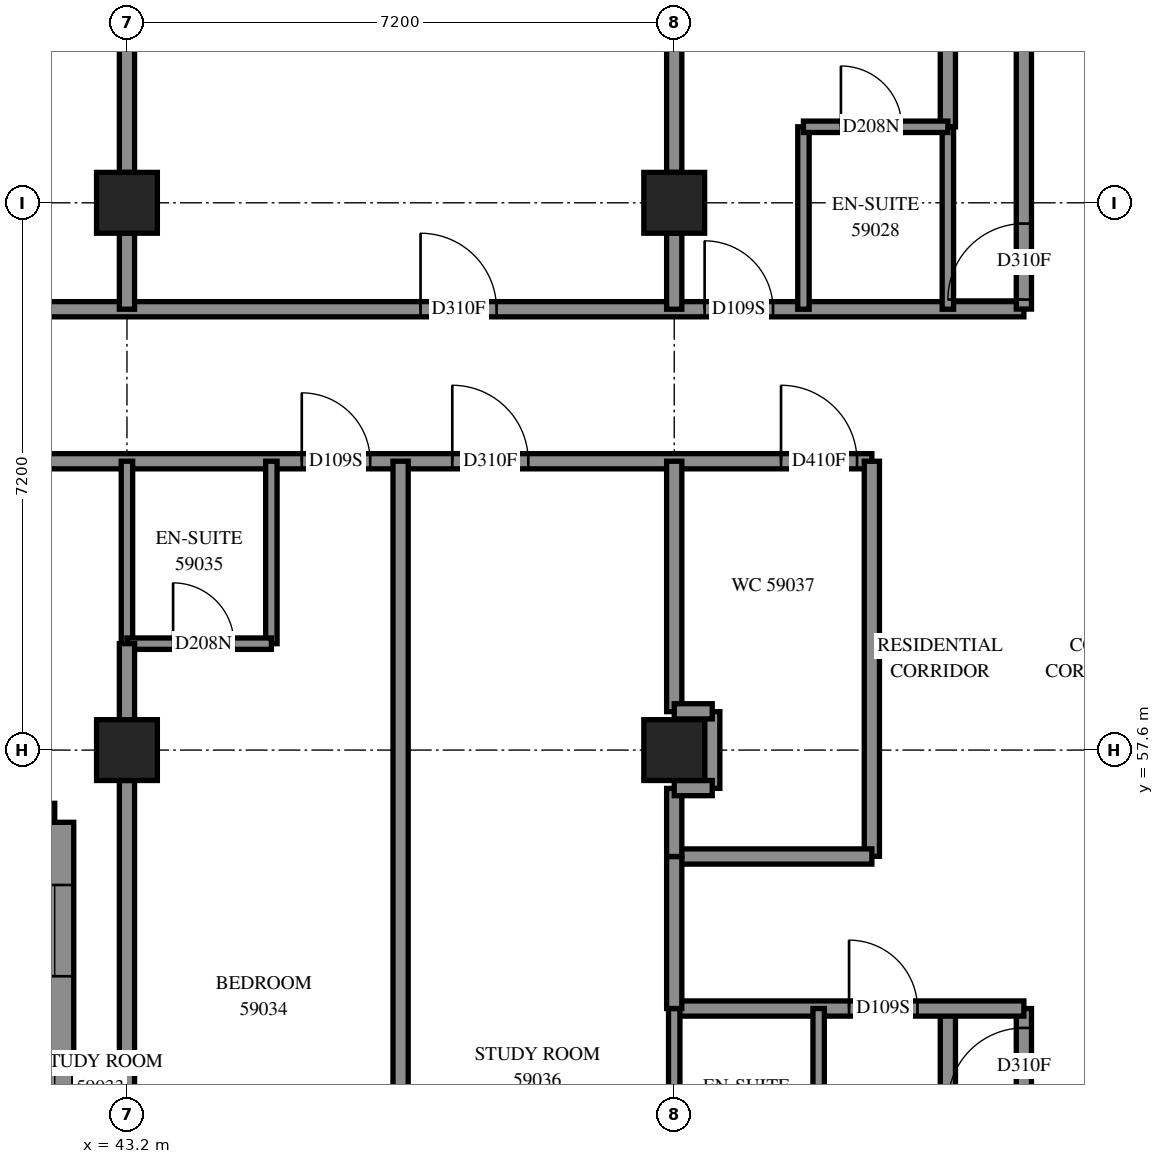
"""IFC4 building model, lengths in metres.
Left out: names, types, materials, properties, quantities, classifications, styles, units other than length and angle.
Written with IfcOpenShell. Run it as: python <this file> out.ifc"""

import sys

from ifc_helpers import new_model, si_unit, direction, frame, frame_2d, origin, origin_2d, place, context, subcontext, project, spatial, polyline, rectangle, outline, extrude, element, fill, save


model = new_model("IFC4")
c1 = context("Model", 3, precision=1e-05, world=origin(), true_north=direction((0.0, 1.0)))
c2 = subcontext(c1, "Body", "Model", "MODEL_VIEW")
j1 = project(units=[si_unit("LENGTHUNIT", "METRE"), si_unit("PLANEANGLEUNIT", "RADIAN")], contexts=[c1])
p1 = place(None, origin())
s1 = spatial("IfcSite", under=j1, at=p1, CompositionType="ELEMENT")
p2 = place(p1, origin())
s2 = spatial("IfcBuilding", under=s1, at=p2, CompositionType="ELEMENT")
p3 = place(p2, frame((0.0, 0.0, 216.8)))
s3 = spatial("IfcBuildingStorey", under=s2, at=p3, CompositionType="ELEMENT", Elevation=216.8)
for number, where, z_axis, x_axis in (
    (1, (43.2, 57.6, 0.0), (0.0, 0.0, 1.0), (1.0, 0.0, 0.0)),
    (2, (43.2, 64.8, 0.0), (0.0, 0.0, 1.0), (1.0, 0.0, 0.0)),
    (3, (50.4, 57.6, 0.0), (0.0, 0.0, 1.0), (1.0, 0.0, 0.0)),
    (4, (50.4, 64.8, 0.0), (0.0, 0.0, 1.0), (1.0, 0.0, 0.0)),
):
    element("IfcColumn", number, at=place(p3, frame(where, z_axis=z_axis, x_axis=x_axis)), inside=s3, PredefinedType="COLUMN", context=c2, shape_type="SweptSolid", body=[
        extrude(rectangle(XDim=0.8, YDim=0.8, at=origin_2d()), origin(), (0.0, 0.0, 1.0), 3.1),
    ])
p4 = place(p3, frame((35.05, 56.65, 0.0), z_axis=(0.0, 0.0, 1.0), x_axis=(1.0, 0.0, 0.0)))
e5 = element("IfcWall", 5, at=p4, inside=s3, PredefinedType="SOLIDWALL", context=c2, shape_type="SweptSolid", body=[
    extrude(outline(polyline([(-0.25, -0.25), (6.95, -0.25), (7.45, 0.25), (0.25, 0.25), (-0.25, -0.25)])), origin(), (0.0, 0.0, 1.0), 3.1),
])
p5 = place(p4, frame((1.35, 0.0, 0.45)))
e6 = element("IfcOpeningElement", 6, at=p5, cuts=e5, PredefinedType="OPENING", context=c2, shape_type="SweptSolid", body=[
    extrude(rectangle(XDim=1.3, YDim=2.5, at=frame_2d((0.65, 1.25))), frame((0.0, 0.26, 0.0), z_axis=(0.0, -1.0, 0.0), x_axis=(1.0, 0.0, 0.0)), (0.0, 0.0, 1.0), 0.52),
])
p6 = place(p4, frame((2.85, 0.0, 0.45)))
e7 = element("IfcOpeningElement", 7, at=p6, cuts=e5, PredefinedType="OPENING", context=c2, shape_type="SweptSolid", body=[
    extrude(rectangle(XDim=1.3, YDim=2.5, at=frame_2d((0.65, 1.25))), frame((0.0, 0.26, 0.0), z_axis=(0.0, -1.0, 0.0), x_axis=(1.0, 0.0, 0.0)), (0.0, 0.0, 1.0), 0.52),
])
p7 = place(p4, frame((5.175, 0.0, 0.45)))
e8 = element("IfcOpeningElement", 8, at=p7, cuts=e5, PredefinedType="OPENING", context=c2, shape_type="SweptSolid", body=[
    extrude(rectangle(XDim=1.2, YDim=2.5, at=frame_2d((0.6, 1.25))), frame((0.0, 0.26, 0.0), z_axis=(0.0, -1.0, 0.0), x_axis=(1.0, 0.0, 0.0)), (0.0, 0.0, 1.0), 0.52),
])
p8 = place(p3, frame((42.25, 56.65, 0.0), z_axis=(0.0, 0.0, 1.0), x_axis=(0.0, -1.0, 0.0)))
e9 = element("IfcWall", 9, at=p8, inside=s3, PredefinedType="SOLIDWALL", context=c2, shape_type="SweptSolid", body=[
    extrude(outline(polyline([(0.25, -0.25), (7.45, -0.25), (6.95, 0.25), (-0.25, 0.25), (0.25, -0.25)])), origin(), (0.0, 0.0, 1.0), 3.1),
])
p9 = place(p8, frame((3.05, 0.0, 0.45)))
e10 = element("IfcOpeningElement", 10, at=p9, cuts=e9, PredefinedType="OPENING", context=c2, shape_type="SweptSolid", body=[
    extrude(rectangle(XDim=1.3, YDim=2.5, at=frame_2d((0.65, 1.25))), frame((0.0, 0.26, 0.0), z_axis=(0.0, -1.0, 0.0), x_axis=(1.0, 0.0, 0.0)), (0.0, 0.0, 1.0), 0.52),
])
p10 = place(p8, frame((4.55, 0.0, 0.45)))
e11 = element("IfcOpeningElement", 11, at=p10, cuts=e9, PredefinedType="OPENING", context=c2, shape_type="SweptSolid", body=[
    extrude(rectangle(XDim=1.3, YDim=2.5, at=frame_2d((0.65, 1.25))), frame((0.0, 0.26, 0.0), z_axis=(0.0, -1.0, 0.0), x_axis=(1.0, 0.0, 0.0)), (0.0, 0.0, 1.0), 0.52),
])
p11 = place(p8, frame((0.825, 0.0, 0.45)))
e12 = element("IfcOpeningElement", 12, at=p11, cuts=e9, PredefinedType="OPENING", context=c2, shape_type="SweptSolid", body=[
    extrude(rectangle(XDim=1.2, YDim=2.5, at=frame_2d((0.6, 1.25))), frame((0.0, 0.26, 0.0), z_axis=(0.0, -1.0, 0.0), x_axis=(1.0, 0.0, 0.0)), (0.0, 0.0, 1.0), 0.52),
])
p12 = place(p3, frame((36.0, 61.4, 0.0), z_axis=(0.0, 0.0, 1.0), x_axis=(1.0, 0.0, 0.0)))
e13 = element("IfcWall", 13, at=p12, inside=s3, PredefinedType="PARTITIONING", context=c2, shape_type="SweptSolid", body=[
    extrude(rectangle(XDim=17.0, YDim=0.2, at=frame_2d((8.5, 0.0))), origin(), (0.0, 0.0, 1.0), 3.1),
])
p13 = place(p12, frame((2.3, 0.0, 0.0)))
e14 = element("IfcOpeningElement", 14, at=p13, cuts=e13, PredefinedType="OPENING", context=c2, shape_type="SweptSolid", body=[
    extrude(rectangle(XDim=0.9, YDim=2.1, at=frame_2d((0.45, 1.05))), frame((0.0, 0.11, 0.0), z_axis=(0.0, -1.0, 0.0), x_axis=(1.0, 0.0, 0.0)), (0.0, 0.0, 1.0), 0.22),
])
p14 = place(p12, frame((4.107, 0.0, 0.0)))
e15 = element("IfcOpeningElement", 15, at=p14, cuts=e13, PredefinedType="OPENING", context=c2, shape_type="SweptSolid", body=[
    extrude(rectangle(XDim=1.0, YDim=2.1, at=frame_2d((0.5, 1.05))), frame((0.0, 0.11, 0.0), z_axis=(0.0, -1.0, 0.0), x_axis=(1.0, 0.0, 0.0)), (0.0, 0.0, 1.0), 0.22),
])
p15 = place(p12, frame((9.5, 0.0, 0.0)))
e16 = element("IfcOpeningElement", 16, at=p15, cuts=e13, PredefinedType="OPENING", context=c2, shape_type="SweptSolid", body=[
    extrude(rectangle(XDim=0.9, YDim=2.1, at=frame_2d((0.45, 1.05))), frame((0.0, 0.11, 0.0), z_axis=(0.0, -1.0, 0.0), x_axis=(1.0, 0.0, 0.0)), (0.0, 0.0, 1.0), 0.22),
])
p16 = place(p12, frame((11.48, 0.0, 0.0)))
e17 = element("IfcOpeningElement", 17, at=p16, cuts=e13, PredefinedType="OPENING", context=c2, shape_type="SweptSolid", body=[
    extrude(rectangle(XDim=1.0, YDim=2.1, at=frame_2d((0.5, 1.05))), frame((0.0, 0.11, 0.0), z_axis=(0.0, -1.0, 0.0), x_axis=(1.0, 0.0, 0.0)), (0.0, 0.0, 1.0), 0.22),
])
p17 = place(p12, frame((15.805, 0.0, 0.0)))
e18 = element("IfcOpeningElement", 18, at=p17, cuts=e13, PredefinedType="OPENING", context=c2, shape_type="SweptSolid", body=[
    extrude(rectangle(XDim=1.0, YDim=2.1, at=frame_2d((0.5, 1.05))), frame((0.0, 0.11, 0.0), z_axis=(0.0, -1.0, 0.0), x_axis=(1.0, 0.0, 0.0)), (0.0, 0.0, 1.0), 0.22),
])
p18 = place(p3, frame((40.602, 63.4, 0.0), z_axis=(0.0, 0.0, 1.0), x_axis=(1.0, 0.0, 0.0)))
e19 = element("IfcWall", 19, at=p18, inside=s3, PredefinedType="PARTITIONING", context=c2, shape_type="SweptSolid", body=[
    extrude(rectangle(XDim=14.398, YDim=0.2, at=frame_2d((7.199, 0.0))), origin(), (0.0, 0.0, 1.0), 3.1),
])
p19 = place(p18, frame((0.124, 0.0, 0.0)))
e20 = element("IfcOpeningElement", 20, at=p19, cuts=e19, PredefinedType="OPENING", context=c2, shape_type="SweptSolid", body=[
    extrude(rectangle(XDim=1.0, YDim=2.1, at=frame_2d((0.5, 1.05))), frame((0.0, 0.11, 0.0), z_axis=(0.0, -1.0, 0.0), x_axis=(1.0, 0.0, 0.0)), (0.0, 0.0, 1.0), 0.22),
])
p20 = place(p18, frame((6.46, 0.0, 0.0)))
e21 = element("IfcOpeningElement", 21, at=p20, cuts=e19, PredefinedType="OPENING", context=c2, shape_type="SweptSolid", body=[
    extrude(rectangle(XDim=1.0, YDim=2.1, at=frame_2d((0.5, 1.05))), frame((0.0, 0.11, 0.0), z_axis=(0.0, -1.0, 0.0), x_axis=(1.0, 0.0, 0.0)), (0.0, 0.0, 1.0), 0.22),
])
p21 = place(p18, frame((10.198, 0.0, 0.0)))
e22 = element("IfcOpeningElement", 22, at=p21, cuts=e19, PredefinedType="OPENING", context=c2, shape_type="SweptSolid", body=[
    extrude(rectangle(XDim=0.9, YDim=2.1, at=frame_2d((0.45, 1.05))), frame((0.0, 0.11, 0.0), z_axis=(0.0, -1.0, 0.0), x_axis=(1.0, 0.0, 0.0)), (0.0, 0.0, 1.0), 0.22),
])
p22 = place(p3, frame((54.0, 42.327, 0.0), z_axis=(0.0, 0.0, 1.0), x_axis=(0.0, 1.0, 0.0)))
e23 = element("IfcWall", 23, at=p22, inside=s3, PredefinedType="PARTITIONING", context=c2, shape_type="SweptSolid", body=[
    extrude(rectangle(XDim=11.873, YDim=0.2, at=frame_2d((5.936, 0.0))), origin(), (0.0, 0.0, 1.0), 3.1),
])
p23 = place(p3, frame((46.8, 49.7, 0.0), z_axis=(0.0, 0.0, 1.0), x_axis=(0.0, 1.0, 0.0)))
e24 = element("IfcWall", 24, at=p23, inside=s3, PredefinedType="PARTITIONING", context=c2, shape_type="SweptSolid", body=[
    extrude(rectangle(XDim=11.7, YDim=0.2, at=frame_2d((5.85, 0.0))), origin(), (0.0, 0.0, 1.0), 3.1),
])
p24 = place(p3, frame((54.0, 65.8, 0.0), z_axis=(0.0, 0.0, 1.0), x_axis=(0.0, 1.0, 0.0)))
e25 = element("IfcWall", 25, at=p24, inside=s3, PredefinedType="PARTITIONING", context=c2, shape_type="SweptSolid", body=[
    extrude(rectangle(XDim=6.992, YDim=0.2, at=frame_2d((3.496, 0.0))), origin(), (0.0, 0.0, 1.0), 3.1),
])
p25 = place(p3, frame((43.2, 50.8, 0.0), z_axis=(0.0, 0.0, 1.0), x_axis=(0.0, 1.0, 0.0)))
e26 = element("IfcWall", 26, at=p25, inside=s3, PredefinedType="PARTITIONING", context=c2, shape_type="SweptSolid", body=[
    extrude(rectangle(XDim=6.4, YDim=0.2, at=frame_2d((3.2, 0.0))), origin(), (0.0, 0.0, 1.0), 2.6),
])
p26 = place(p3, frame((55.0, 47.8, 0.0), z_axis=(0.0, 0.0, 1.0), x_axis=(0.0, 1.0, 0.0)))
e27 = element("IfcWall", 27, at=p26, inside=s3, PredefinedType="PARTITIONING", context=c2, shape_type="SweptSolid", body=[
    extrude(rectangle(XDim=6.4, YDim=0.2, at=frame_2d((3.2, 0.0))), origin(), (0.0, 0.0, 1.0), 3.1),
])
p27 = place(p26, frame((5.145, 0.0, 0.0)))
e28 = element("IfcOpeningElement", 28, at=p27, cuts=e27, PredefinedType="OPENING", context=c2, shape_type="SweptSolid", body=[
    extrude(rectangle(XDim=1.0, YDim=2.1, at=frame_2d((0.5, 1.05))), frame((0.0, 0.11, 0.0), z_axis=(0.0, -1.0, 0.0), x_axis=(1.0, 0.0, 0.0)), (0.0, 0.0, 1.0), 0.22),
])
for number, where, z_axis, x_axis in (
    (29, (43.2, 65.2, 0.0), (0.0, 0.0, 1.0), (0.0, 1.0, 0.0)),
    (30, (50.4, 65.2, 0.0), (0.0, 0.0, 1.0), (0.0, 1.0, 0.0)),
):
    element("IfcWall", number, at=place(p3, frame(where, z_axis=z_axis, x_axis=x_axis)), inside=s3, PredefinedType="PARTITIONING", context=c2, shape_type="SweptSolid", body=[
        extrude(rectangle(XDim=6.4, YDim=0.2, at=frame_2d((3.2, 0.0))), origin(), (0.0, 0.0, 1.0), 3.1),
    ])
p28 = place(p3, frame((53.0, 56.202, 0.0), z_axis=(0.0, 0.0, 1.0), x_axis=(0.0, 1.0, 0.0)))
e31 = element("IfcWall", 31, at=p28, inside=s3, PredefinedType="PARTITIONING", context=c2, shape_type="SweptSolid", body=[
    extrude(rectangle(XDim=5.198, YDim=0.2, at=frame_2d((2.599, 0.0))), origin(), (0.0, 0.0, 1.0), 3.1),
])
p29 = place(p3, frame((50.4, 54.2, 0.0), z_axis=(0.0, 0.0, 1.0), x_axis=(1.0, 0.0, 0.0)))
e32 = element("IfcWall", 32, at=p29, inside=s3, PredefinedType="PARTITIONING", context=c2, shape_type="SweptSolid", body=[
    extrude(rectangle(XDim=4.6, YDim=0.2, at=frame_2d((2.3, 0.0))), origin(), (0.0, 0.0, 1.0), 3.1),
])
p30 = place(p29, frame((2.3, 0.0, 0.0)))
e33 = element("IfcOpeningElement", 33, at=p30, cuts=e32, PredefinedType="OPENING", context=c2, shape_type="SweptSolid", body=[
    extrude(rectangle(XDim=0.9, YDim=2.1, at=frame_2d((0.45, 1.05))), frame((0.0, 0.11, 0.0), z_axis=(0.0, -1.0, 0.0), x_axis=(1.0, 0.0, 0.0)), (0.0, 0.0, 1.0), 0.22),
])
p31 = place(p3, frame((55.0, 63.402, 0.0), z_axis=(0.0, 0.0, 1.0), x_axis=(0.0, 1.0, 0.0)))
e34 = element("IfcWall", 34, at=p31, inside=s3, PredefinedType="PARTITIONING", context=c2, shape_type="SweptSolid", body=[
    extrude(rectangle(XDim=3.998, YDim=0.2, at=frame_2d((1.999, 0.0))), origin(), (0.0, 0.0, 1.0), 3.1),
])
p32 = place(p31, frame((0.125, 0.0, 0.0)))
e35 = element("IfcOpeningElement", 35, at=p32, cuts=e34, PredefinedType="OPENING", context=c2, shape_type="SweptSolid", body=[
    extrude(rectangle(XDim=1.0, YDim=2.1, at=frame_2d((0.5, 1.05))), frame((0.0, 0.11, 0.0), z_axis=(0.0, -1.0, 0.0), x_axis=(1.0, 0.0, 0.0)), (0.0, 0.0, 1.0), 0.22),
])
p33 = place(p3, frame((50.4, 58.106, 0.0), z_axis=(0.0, 0.0, 1.0), x_axis=(0.0, 1.0, 0.0)))
e36 = element("IfcWall", 36, at=p33, inside=s3, PredefinedType="PARTITIONING", context=c2, shape_type="SweptSolid", body=[
    extrude(rectangle(XDim=3.294, YDim=0.2, at=frame_2d((1.647, 0.0))), origin(), (0.0, 0.0, 1.0), 3.1),
])
p34 = place(p3, frame((50.4, 56.2, 0.0), z_axis=(0.0, 0.0, 1.0), x_axis=(1.0, 0.0, 0.0)))
e37 = element("IfcWall", 37, at=p34, inside=s3, PredefinedType="PARTITIONING", context=c2, shape_type="SweptSolid", body=[
    extrude(rectangle(XDim=2.6, YDim=0.2, at=frame_2d((1.3, 0.0))), origin(), (0.0, 0.0, 1.0), 3.1),
])
for number, where, z_axis, x_axis in (
    (38, (52.3, 51.8, 0.0), (0.0, 0.0, 1.0), (0.0, 1.0, 0.0)),
    (39, (50.4, 51.8, 0.0), (0.0, 0.0, 1.0), (0.0, 1.0, 0.0)),
    (40, (45.1, 59.0, 0.0), (0.0, 0.0, 1.0), (0.0, 1.0, 0.0)),
    (41, (43.2, 59.0, 0.0), (0.0, 0.0, 1.0), (0.0, 1.0, 0.0)),
    (42, (52.1, 63.4, 0.0), (0.0, 0.0, 1.0), (0.0, 1.0, 0.0)),
    (43, (54.0, 63.4, 0.0), (0.0, 0.0, 1.0), (0.0, 1.0, 0.0)),
):
    element("IfcWall", number, at=place(p3, frame(where, z_axis=z_axis, x_axis=x_axis)), inside=s3, PredefinedType="PARTITIONING", context=c2, shape_type="SweptSolid", body=[
        extrude(rectangle(XDim=2.4, YDim=0.15, at=frame_2d((1.2, 0.0))), origin(), (0.0, 0.0, 1.0), 3.1),
    ])
p35 = place(p3, frame((50.4, 54.2, 0.0), z_axis=(0.0, 0.0, 1.0), x_axis=(0.0, 1.0, 0.0)))
e44 = element("IfcWall", 44, at=p35, inside=s3, PredefinedType="PARTITIONING", context=c2, shape_type="SweptSolid", body=[
    extrude(rectangle(XDim=2.0, YDim=0.2, at=frame_2d((1.0, 0.0))), origin(), (0.0, 0.0, 1.0), 3.1),
])
p36 = place(p3, frame((43.2, 59.0, 0.0), z_axis=(0.0, 0.0, 1.0), x_axis=(1.0, 0.0, 0.0)))
e45 = element("IfcWall", 45, at=p36, inside=s3, PredefinedType="PARTITIONING", context=c2, shape_type="SweptSolid", body=[
    extrude(rectangle(XDim=1.9, YDim=0.15, at=frame_2d((0.95, 0.0))), origin(), (0.0, 0.0, 1.0), 3.1),
])
p37 = place(p36, frame((0.607, 0.0, 0.0)))
e46 = element("IfcOpeningElement", 46, at=p37, cuts=e45, PredefinedType="OPENING", context=c2, shape_type="SweptSolid", body=[
    extrude(rectangle(XDim=0.8, YDim=2.1, at=frame_2d((0.4, 1.05))), frame((0.0, 0.085, 0.0), z_axis=(0.0, -1.0, 0.0), x_axis=(1.0, 0.0, 0.0)), (0.0, 0.0, 1.0), 0.17),
])
p38 = place(p3, frame((52.1, 65.8, 0.0), z_axis=(0.0, 0.0, 1.0), x_axis=(1.0, 0.0, 0.0)))
e47 = element("IfcWall", 47, at=p38, inside=s3, PredefinedType="PARTITIONING", context=c2, shape_type="SweptSolid", body=[
    extrude(rectangle(XDim=1.9, YDim=0.15, at=frame_2d((0.95, 0.0))), origin(), (0.0, 0.0, 1.0), 3.1),
])
p39 = place(p38, frame((0.493, 0.0, 0.0)))
e48 = element("IfcOpeningElement", 48, at=p39, cuts=e47, PredefinedType="OPENING", context=c2, shape_type="SweptSolid", body=[
    extrude(rectangle(XDim=0.8, YDim=2.1, at=frame_2d((0.4, 1.05))), frame((0.0, 0.085, 0.0), z_axis=(0.0, -1.0, 0.0), x_axis=(1.0, 0.0, 0.0)), (0.0, 0.0, 1.0), 0.17),
])
p40 = place(p3, frame((50.9, 57.096, 0.0), z_axis=(0.0, 0.0, 1.0), x_axis=(0.0, 1.0, 0.0)))
e49 = element("IfcWall", 49, at=p40, inside=s3, PredefinedType="PARTITIONING", context=c2, shape_type="SweptSolid", body=[
    extrude(rectangle(XDim=1.01, YDim=0.2, at=frame_2d((0.505, 0.0))), origin(), (0.0, 0.0, 1.0), 3.1),
])
for number, where, z_axis, x_axis in (
    (50, (43.2, 63.4, 0.0), (0.0, 0.0, 1.0), (0.0, 1.0, 0.0)),
    (51, (50.4, 63.4, 0.0), (0.0, 0.0, 1.0), (0.0, 1.0, 0.0)),
    (52, (43.2, 58.0, 0.0), (0.0, 0.0, 1.0), (0.0, 1.0, 0.0)),
):
    element("IfcWall", number, at=place(p3, frame(where, z_axis=z_axis, x_axis=x_axis)), inside=s3, PredefinedType="PARTITIONING", context=c2, shape_type="SweptSolid", body=[
        extrude(rectangle(XDim=1.0, YDim=0.2, at=frame_2d((0.5, 0.0))), origin(), (0.0, 0.0, 1.0), 3.1),
    ])
p41 = place(p3, frame((50.4, 56.2, 0.0), z_axis=(0.0, 0.0, 1.0), x_axis=(0.0, 1.0, 0.0)))
e53 = element("IfcWall", 53, at=p41, inside=s3, PredefinedType="PARTITIONING", context=c2, shape_type="SweptSolid", body=[
    extrude(rectangle(XDim=0.896, YDim=0.2, at=frame_2d((0.448, 0.0))), origin(), (0.0, 0.0, 1.0), 3.1),
])
for number, where, z_axis, x_axis in (
    (54, (50.4, 58.11, 0.0), (0.0, 0.0, 1.0), (1.0, 0.0, 0.0)),
    (55, (50.4, 57.1, 0.0), (0.0, 0.0, 1.0), (1.0, 0.0, 0.0)),
):
    element("IfcWall", number, at=place(p3, frame(where, z_axis=z_axis, x_axis=x_axis)), inside=s3, PredefinedType="PARTITIONING", context=c2, shape_type="SweptSolid", body=[
        extrude(rectangle(XDim=0.5, YDim=0.2, at=frame_2d((0.25, 0.0))), origin(), (0.0, 0.0, 1.0), 3.1),
    ])
p42 = place(p9, origin())
e56 = element("IfcWindow", 56, at=p42, inside=s3, PartitioningType="SINGLE_PANEL", PredefinedType="WINDOW", context=c2, shape_type="SweptSolid", body=[
    extrude(rectangle(XDim=1.3, YDim=2.5, at=frame_2d((0.65, 1.25))), frame((0.0, 0.18, 0.0), z_axis=(0.0, -1.0, 0.0), x_axis=(1.0, 0.0, 0.0)), (0.0, 0.0, 1.0), 0.06),
])
fill(e10, e56)
p43 = place(p11, origin())
e57 = element("IfcWindow", 57, at=p43, inside=s3, PartitioningType="SINGLE_PANEL", PredefinedType="WINDOW", context=c2, shape_type="SweptSolid", body=[
    extrude(rectangle(XDim=1.2, YDim=2.5, at=frame_2d((0.6, 1.25))), frame((0.0, 0.18, 0.0), z_axis=(0.0, -1.0, 0.0), x_axis=(1.0, 0.0, 0.0)), (0.0, 0.0, 1.0), 0.06),
])
fill(e12, e57)
p44 = place(p20, origin())
e58 = element("IfcDoor", 58, at=p44, inside=s3, OperationType="SINGLE_SWING_RIGHT", PredefinedType="DOOR", context=c2, shape_type="SweptSolid", body=[
    extrude(rectangle(XDim=1.0, YDim=2.1, at=frame_2d((0.5, 1.05))), frame((0.0, 0.025, 0.0), z_axis=(0.0, -1.0, 0.0), x_axis=(1.0, 0.0, 0.0)), (0.0, 0.0, 1.0), 0.05),
])
fill(e21, e58)
p45 = place(p21, origin())
e59 = element("IfcDoor", 59, at=p45, inside=s3, OperationType="SINGLE_SWING_RIGHT", PredefinedType="DOOR", context=c2, shape_type="SweptSolid", body=[
    extrude(rectangle(XDim=0.9, YDim=2.1, at=frame_2d((0.45, 1.05))), frame((0.0, 0.025, 0.0), z_axis=(0.0, -1.0, 0.0), x_axis=(1.0, 0.0, 0.0)), (0.0, 0.0, 1.0), 0.05),
])
fill(e22, e59)
p46 = place(p39, origin())
e60 = element("IfcDoor", 60, at=p46, inside=s3, OperationType="SINGLE_SWING_RIGHT", PredefinedType="DOOR", context=c2, shape_type="SweptSolid", body=[
    extrude(rectangle(XDim=0.8, YDim=2.1, at=frame_2d((0.4, 1.05))), frame((0.0, 0.025, 0.0), z_axis=(0.0, -1.0, 0.0), x_axis=(1.0, 0.0, 0.0)), (0.0, 0.0, 1.0), 0.05),
])
fill(e48, e60)
p47 = place(p32, origin())
e61 = element("IfcDoor", 61, at=p47, inside=s3, OperationType="SINGLE_SWING_LEFT", PredefinedType="DOOR", context=c2, shape_type="SweptSolid", body=[
    extrude(rectangle(XDim=1.0, YDim=2.1, at=frame_2d((0.5, 1.05))), frame((0.0, 0.025, 0.0), z_axis=(0.0, -1.0, 0.0), x_axis=(1.0, 0.0, 0.0)), (0.0, 0.0, 1.0), 0.05),
])
fill(e35, e61)
p48 = place(p15, origin())
e62 = element("IfcDoor", 62, at=p48, inside=s3, OperationType="SINGLE_SWING_LEFT", PredefinedType="DOOR", context=c2, shape_type="SweptSolid", body=[
    extrude(rectangle(XDim=0.9, YDim=2.1, at=frame_2d((0.45, 1.05))), frame((0.0, 0.025, 0.0), z_axis=(0.0, -1.0, 0.0), x_axis=(1.0, 0.0, 0.0)), (0.0, 0.0, 1.0), 0.05),
])
fill(e16, e62)
p49 = place(p37, origin())
e63 = element("IfcDoor", 63, at=p49, inside=s3, OperationType="SINGLE_SWING_RIGHT", PredefinedType="DOOR", context=c2, shape_type="SweptSolid", body=[
    extrude(rectangle(XDim=0.8, YDim=2.1, at=frame_2d((0.4, 1.05))), frame((0.0, 0.025, 0.0), z_axis=(0.0, -1.0, 0.0), x_axis=(1.0, 0.0, 0.0)), (0.0, 0.0, 1.0), 0.05),
])
fill(e46, e63)
p50 = place(p16, origin())
e64 = element("IfcDoor", 64, at=p50, inside=s3, OperationType="SINGLE_SWING_RIGHT", PredefinedType="DOOR", context=c2, shape_type="SweptSolid", body=[
    extrude(rectangle(XDim=1.0, YDim=2.1, at=frame_2d((0.5, 1.05))), frame((0.0, 0.025, 0.0), z_axis=(0.0, -1.0, 0.0), x_axis=(1.0, 0.0, 0.0)), (0.0, 0.0, 1.0), 0.05),
])
fill(e17, e64)
p51 = place(p17, origin())
e65 = element("IfcDoor", 65, at=p51, inside=s3, OperationType="SINGLE_SWING_LEFT", PredefinedType="DOOR", context=c2, shape_type="SweptSolid", body=[
    extrude(rectangle(XDim=1.0, YDim=2.1, at=frame_2d((0.5, 1.05))), frame((0.0, 0.025, 0.0), z_axis=(0.0, -1.0, 0.0), x_axis=(1.0, 0.0, 0.0)), (0.0, 0.0, 1.0), 0.05),
])
fill(e18, e65)
p52 = place(p30, origin())
e66 = element("IfcDoor", 66, at=p52, inside=s3, OperationType="SINGLE_SWING_LEFT", PredefinedType="DOOR", context=c2, shape_type="SweptSolid", body=[
    extrude(rectangle(XDim=0.9, YDim=2.1, at=frame_2d((0.45, 1.05))), frame((0.0, 0.025, 0.0), z_axis=(0.0, -1.0, 0.0), x_axis=(1.0, 0.0, 0.0)), (0.0, 0.0, 1.0), 0.05),
])
fill(e33, e66)
p53 = place(p27, origin())
e67 = element("IfcDoor", 67, at=p53, inside=s3, OperationType="SINGLE_SWING_RIGHT", PredefinedType="DOOR", context=c2, shape_type="SweptSolid", body=[
    extrude(rectangle(XDim=1.0, YDim=2.1, at=frame_2d((0.5, 1.05))), frame((0.0, 0.025, 0.0), z_axis=(0.0, -1.0, 0.0), x_axis=(1.0, 0.0, 0.0)), (0.0, 0.0, 1.0), 0.05),
])
fill(e28, e67)
save(model, sys.argv[1])
